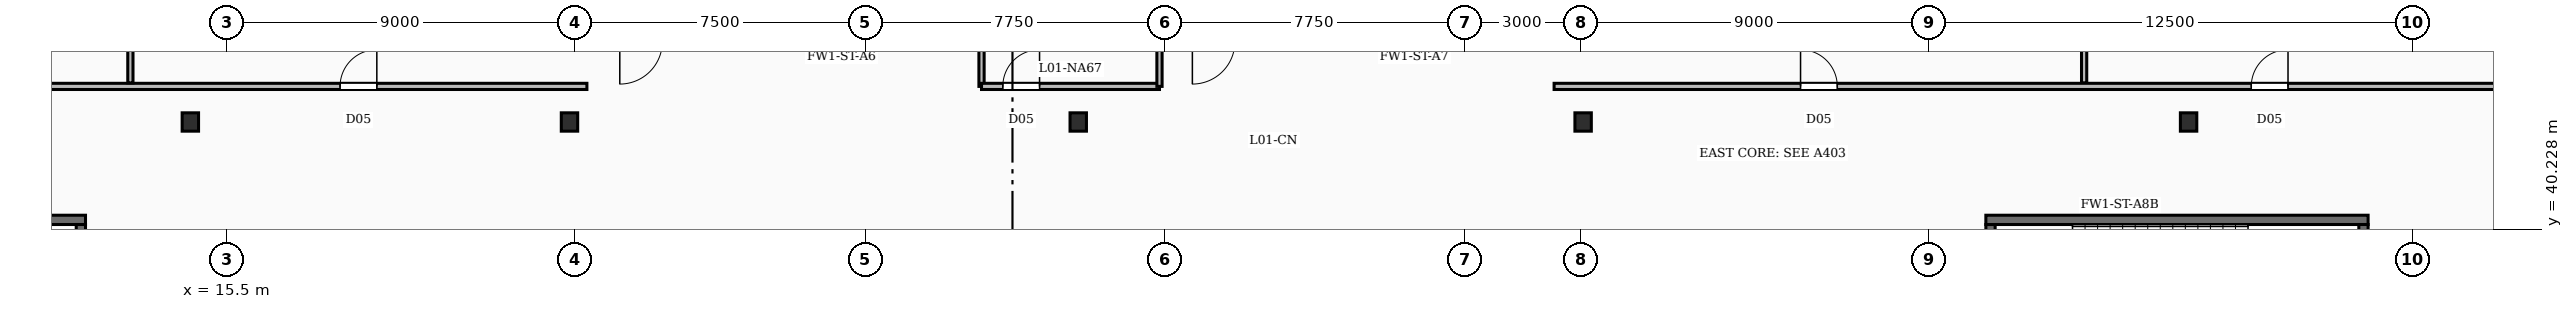
"""IFC4 building model, lengths in metres.
Left out: names, types, materials, properties, quantities, classifications, styles, units other than length and angle.
Written with IfcOpenShell. Run it as: python <this file> out.ifc"""

import sys

from ifc_helpers import new_model, si_unit, direction, frame, frame_2d, origin, origin_2d, place, context, subcontext, project, spatial, rectangle, i_section, extrude, element, fill, save


model = new_model("IFC4")
c1 = context("Model", 3, precision=1e-05, world=origin(), true_north=direction((0.0, 1.0)))
c2 = subcontext(c1, "Body", "Model", "MODEL_VIEW")
j1 = project(units=[si_unit("LENGTHUNIT", "METRE"), si_unit("PLANEANGLEUNIT", "RADIAN")], contexts=[c1])
p1 = place(None, origin())
s1 = spatial("IfcSite", under=j1, at=p1, CompositionType="ELEMENT")
p2 = place(p1, origin())
s2 = spatial("IfcBuilding", under=s1, at=p2, CompositionType="ELEMENT")
p3 = place(p2, frame((0.0, 0.0, 8.0)))
s3 = spatial("IfcBuildingStorey", under=s2, at=p3, CompositionType="ELEMENT", Elevation=8.0)
for number, where, z_axis, x_axis in (
    (1, (14.55, 43.0, -0.35), (0.0, 0.0, 1.0), (1.0, 0.0, 0.0)),
    (2, (24.35, 43.0, -0.35), (0.0, 0.0, 1.0), (1.0, 0.0, 0.0)),
    (3, (37.5, 43.0, -0.35), (0.0, 0.0, 1.0), (1.0, 0.0, 0.0)),
    (4, (50.55, 43.0, -0.35), (0.0, 0.0, 1.0), (1.0, 0.0, 0.0)),
    (5, (66.2, 43.0, -0.35), (0.0, 0.0, 1.0), (1.0, 0.0, 0.0)),
):
    element("IfcColumn", number, at=place(p3, frame(where, z_axis=z_axis, x_axis=x_axis)), inside=s3, PredefinedType="COLUMN", context=c2, shape_type="SweptSolid", body=[
        extrude(i_section(OverallWidth=0.424, OverallDepth=0.474, WebThickness=0.048, FlangeThickness=0.077, FilletRadius=0.02, at=origin_2d()), origin(), (0.0, 0.0, 1.0), 5.0),
    ])
p4 = place(p3, frame((1.96, 40.47, 0.0), z_axis=(0.0, 0.0, 1.0), x_axis=(1.0, 0.0, 0.0)))
e6 = element("IfcWall", 6, at=p4, inside=s3, PredefinedType="SOLIDWALL", context=c2, shape_type="SweptSolid", body=[
    extrude(rectangle(XDim=9.88, YDim=0.24, at=frame_2d((4.94, 0.0))), origin(), (0.0, 0.0, 1.0), 4.65),
])
p5 = place(p3, frame((11.72, 36.2, 0.0), z_axis=(0.0, 0.0, 1.0), x_axis=(0.0, 1.0, 0.0)))
e7 = element("IfcWall", 7, at=p5, inside=s3, PredefinedType="SOLIDWALL", context=c2, shape_type="SweptSolid", body=[
    extrude(rectangle(XDim=4.15, YDim=0.24, at=frame_2d((2.075, 0.0))), origin(), (0.0, 0.0, 1.0), 4.65),
])
p6 = place(p3, frame((60.96, 40.47, 0.0), z_axis=(0.0, 0.0, 1.0), x_axis=(1.0, 0.0, 0.0)))
e8 = element("IfcWall", 8, at=p6, inside=s3, PredefinedType="SOLIDWALL", context=c2, shape_type="SweptSolid", body=[
    extrude(rectangle(XDim=9.88, YDim=0.24, at=frame_2d((4.94, 0.0))), origin(), (0.0, 0.0, 1.0), 4.65),
])
for number, where, z_axis, x_axis in (
    (9, (61.08, 36.2, 0.0), (0.0, 0.0, 1.0), (0.0, 1.0, 0.0)),
    (10, (70.72, 36.2, 0.0), (0.0, 0.0, 1.0), (0.0, 1.0, 0.0)),
):
    element("IfcWall", number, at=place(p3, frame(where, z_axis=z_axis, x_axis=x_axis)), inside=s3, PredefinedType="SOLIDWALL", context=c2, shape_type="SweptSolid", body=[
        extrude(rectangle(XDim=4.15, YDim=0.24, at=frame_2d((2.075, 0.0))), origin(), (0.0, 0.0, 1.0), 4.65),
    ])
p7 = place(p3, frame((13.0, 44.01, 0.0), z_axis=(0.0, 0.0, 1.0), x_axis=(0.0, 1.0, 0.0)))
e11 = element("IfcWall", 11, at=p7, inside=s3, PredefinedType="PARTITIONING", context=c2, shape_type="SweptSolid", body=[
    extrude(rectangle(XDim=10.49, YDim=0.135, at=frame_2d((5.245, 0.0))), origin(), (0.0, 0.0, 1.0), 3.71),
])
p8 = place(p7, frame((2.2, 0.0, 0.0)))
e12 = element("IfcOpeningElement", 12, at=p8, cuts=e11, PredefinedType="OPENING", context=c2, shape_type="SweptSolid", body=[
    extrude(rectangle(XDim=0.95, YDim=2.15, at=frame_2d((0.475, 1.075))), frame((0.0, 0.077, 0.0), z_axis=(0.0, -1.0, 0.0), x_axis=(1.0, 0.0, 0.0)), (0.0, 0.0, 1.0), 0.155),
])
p9 = place(p3, frame((0.0, 43.92, 0.0), z_axis=(0.0, 0.0, 1.0), x_axis=(1.0, 0.0, 0.0)))
e13 = element("IfcWall", 13, at=p9, inside=s3, PredefinedType="PARTITIONING", context=c2, shape_type="SweptSolid", body=[
    extrude(rectangle(XDim=24.8, YDim=0.16, at=frame_2d((12.4, 0.0))), origin(), (0.0, 0.0, 1.0), 3.71),
])
p10 = place(p9, frame((18.42, 0.0, 0.0)))
e14 = element("IfcOpeningElement", 14, at=p10, cuts=e13, PredefinedType="OPENING", context=c2, shape_type="SweptSolid", body=[
    extrude(rectangle(XDim=0.95, YDim=2.15, at=frame_2d((0.475, 1.075))), frame((0.0, 0.09, 0.0), z_axis=(0.0, -1.0, 0.0), x_axis=(1.0, 0.0, 0.0)), (0.0, 0.0, 1.0), 0.18),
])
p11 = place(p3, frame((63.5, 44.01, 0.0), z_axis=(0.0, 0.0, 1.0), x_axis=(0.0, 1.0, 0.0)))
e15 = element("IfcWall", 15, at=p11, inside=s3, PredefinedType="PARTITIONING", context=c2, shape_type="SweptSolid", body=[
    extrude(rectangle(XDim=10.49, YDim=0.135, at=frame_2d((5.245, 0.0))), origin(), (0.0, 0.0, 1.0), 3.71),
])
p12 = place(p11, frame((2.2, 0.0, 0.0)))
e16 = element("IfcOpeningElement", 16, at=p12, cuts=e15, PredefinedType="OPENING", context=c2, shape_type="SweptSolid", body=[
    extrude(rectangle(XDim=0.95, YDim=2.15, at=frame_2d((0.475, 1.075))), frame((0.0, 0.077, 0.0), z_axis=(0.0, -1.0, 0.0), x_axis=(1.0, 0.0, 0.0)), (0.0, 0.0, 1.0), 0.155),
])
p13 = place(p3, frame((49.8, 43.92, 0.0), z_axis=(0.0, 0.0, 1.0), x_axis=(1.0, 0.0, 0.0)))
e17 = element("IfcWall", 17, at=p13, inside=s3, PredefinedType="PARTITIONING", context=c2, shape_type="SweptSolid", body=[
    extrude(rectangle(XDim=29.7, YDim=0.16, at=frame_2d((14.85, 0.0))), origin(), (0.0, 0.0, 1.0), 3.71),
])
p14 = place(p13, frame((6.37, 0.0, 0.0)))
e18 = element("IfcOpeningElement", 18, at=p14, cuts=e17, PredefinedType="OPENING", context=c2, shape_type="SweptSolid", body=[
    extrude(rectangle(XDim=0.95, YDim=2.15, at=frame_2d((0.475, 1.075))), frame((0.0, 0.09, 0.0), z_axis=(0.0, -1.0, 0.0), x_axis=(1.0, 0.0, 0.0)), (0.0, 0.0, 1.0), 0.18),
])
p15 = place(p13, frame((18.02, 0.0, 0.0)))
e19 = element("IfcOpeningElement", 19, at=p15, cuts=e17, PredefinedType="OPENING", context=c2, shape_type="SweptSolid", body=[
    extrude(rectangle(XDim=0.95, YDim=2.15, at=frame_2d((0.475, 1.075))), frame((0.0, 0.09, 0.0), z_axis=(0.0, -1.0, 0.0), x_axis=(1.0, 0.0, 0.0)), (0.0, 0.0, 1.0), 0.18),
])
p16 = place(p3, frame((35.0, 43.92, 0.0), z_axis=(0.0, 0.0, 1.0), x_axis=(1.0, 0.0, 0.0)))
e20 = element("IfcWall", 20, at=p16, inside=s3, PredefinedType="PARTITIONING", context=c2, shape_type="SweptSolid", body=[
    extrude(rectangle(XDim=4.6, YDim=0.16, at=frame_2d((2.3, 0.0))), origin(), (0.0, 0.0, 1.0), 3.71),
])
p17 = place(p16, frame((0.55, 0.0, 0.0)))
e21 = element("IfcOpeningElement", 21, at=p17, cuts=e20, PredefinedType="OPENING", context=c2, shape_type="SweptSolid", body=[
    extrude(rectangle(XDim=0.95, YDim=2.15, at=frame_2d((0.475, 1.075))), frame((0.0, 0.09, 0.0), z_axis=(0.0, -1.0, 0.0), x_axis=(1.0, 0.0, 0.0)), (0.0, 0.0, 1.0), 0.18),
])
for number, where, z_axis, x_axis in (
    (22, (35.0, 43.92, 0.0), (0.0, 0.0, 1.0), (0.0, 1.0, 0.0)),
    (23, (39.6, 43.92, 0.0), (0.0, 0.0, 1.0), (0.0, 1.0, 0.0)),
):
    element("IfcWall", number, at=place(p3, frame(where, z_axis=z_axis, x_axis=x_axis)), inside=s3, PredefinedType="PARTITIONING", context=c2, shape_type="SweptSolid", body=[
        extrude(rectangle(XDim=10.58, YDim=0.135, at=frame_2d((5.29, 0.0))), origin(), (0.0, 0.0, 1.0), 3.71),
    ])
p18 = place(p10, origin())
e24 = element("IfcDoor", 24, at=p18, inside=s3, OperationType="SINGLE_SWING_RIGHT", PredefinedType="DOOR", context=c2, shape_type="SweptSolid", body=[
    extrude(rectangle(XDim=0.95, YDim=2.15, at=frame_2d((0.475, 1.075))), frame((0.0, 0.025, 0.0), z_axis=(0.0, -1.0, 0.0), x_axis=(1.0, 0.0, 0.0)), (0.0, 0.0, 1.0), 0.05),
])
fill(e14, e24)
p19 = place(p14, origin())
e25 = element("IfcDoor", 25, at=p19, inside=s3, OperationType="SINGLE_SWING_LEFT", PredefinedType="DOOR", context=c2, shape_type="SweptSolid", body=[
    extrude(rectangle(XDim=0.95, YDim=2.15, at=frame_2d((0.475, 1.075))), frame((0.0, 0.025, 0.0), z_axis=(0.0, -1.0, 0.0), x_axis=(1.0, 0.0, 0.0)), (0.0, 0.0, 1.0), 0.05),
])
fill(e18, e25)
p20 = place(p15, origin())
e26 = element("IfcDoor", 26, at=p20, inside=s3, OperationType="SINGLE_SWING_RIGHT", PredefinedType="DOOR", context=c2, shape_type="SweptSolid", body=[
    extrude(rectangle(XDim=0.95, YDim=2.15, at=frame_2d((0.475, 1.075))), frame((0.0, 0.025, 0.0), z_axis=(0.0, -1.0, 0.0), x_axis=(1.0, 0.0, 0.0)), (0.0, 0.0, 1.0), 0.05),
])
fill(e19, e26)
p21 = place(p17, origin())
e27 = element("IfcDoor", 27, at=p21, inside=s3, OperationType="SINGLE_SWING_RIGHT", PredefinedType="DOOR", context=c2, shape_type="SweptSolid", body=[
    extrude(rectangle(XDim=0.95, YDim=2.15, at=frame_2d((0.475, 1.075))), frame((0.0, 0.025, 0.0), z_axis=(0.0, -1.0, 0.0), x_axis=(1.0, 0.0, 0.0)), (0.0, 0.0, 1.0), 0.05),
])
fill(e21, e27)
save(model, sys.argv[1])
